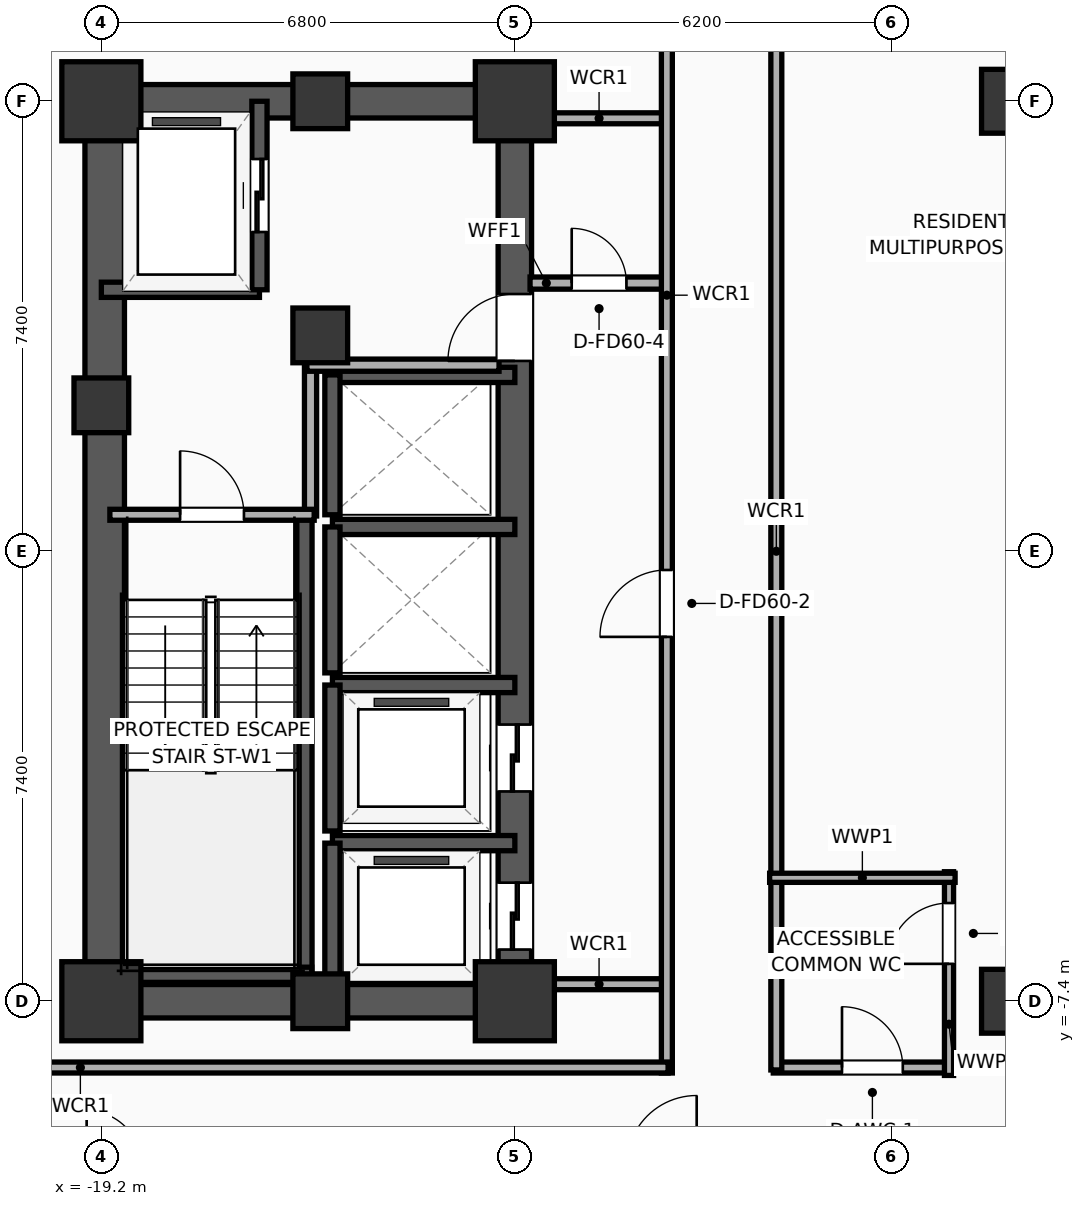
"""IFC4 building model, lengths in metres.
Left out: names, types, materials, properties, quantities, classifications, styles, units other than length and angle.
Written with IfcOpenShell. Run it as: python <this file> out.ifc"""

import sys

from ifc_helpers import new_model, si_unit, direction, frame, frame_2d, origin, origin_2d, place, context, subcontext, project, spatial, rectangle, extrude, element, fill, save


model = new_model("IFC4")
c1 = context("Model", 3, precision=1e-05, world=origin(), true_north=direction((0.0, 1.0)))
c2 = subcontext(c1, "Body", "Model", "MODEL_VIEW")
j1 = project(units=[si_unit("LENGTHUNIT", "METRE"), si_unit("PLANEANGLEUNIT", "RADIAN")], contexts=[c1])
p1 = place(None, origin())
s1 = spatial("IfcSite", under=j1, at=p1, CompositionType="ELEMENT")
p2 = place(p1, origin())
s2 = spatial("IfcBuilding", under=s1, at=p2, CompositionType="ELEMENT")
p3 = place(p2, frame((0.0, 0.0, 97.5)))
s3 = spatial("IfcBuildingStorey", under=s2, at=p3, CompositionType="ELEMENT", Elevation=97.5)
p4 = place(p3, frame((-19.2, -7.4, 0.0), z_axis=(0.0, 0.0, 1.0), x_axis=(1.0, 0.0, 0.0)))
e1 = element("IfcColumn", 1, at=p4, inside=s3, PredefinedType="COLUMN", context=c2, shape_type="SweptSolid", body=[
    extrude(rectangle(XDim=1.3, YDim=1.3, at=origin_2d()), origin(), (0.0, 0.0, 1.0), 3.9),
])
p5 = place(p3, frame((-19.2, 2.4, 0.0), z_axis=(0.0, 0.0, 1.0), x_axis=(1.0, 0.0, 0.0)))
e2 = element("IfcColumn", 2, at=p5, inside=s3, PredefinedType="COLUMN", context=c2, shape_type="SweptSolid", body=[
    extrude(rectangle(XDim=0.9, YDim=0.9, at=origin_2d()), origin(), (0.0, 0.0, 1.0), 3.9),
])
p6 = place(p3, frame((-19.2, 7.4, 0.0), z_axis=(0.0, 0.0, 1.0), x_axis=(1.0, 0.0, 0.0)))
e3 = element("IfcColumn", 3, at=p6, inside=s3, PredefinedType="COLUMN", context=c2, shape_type="SweptSolid", body=[
    extrude(rectangle(XDim=1.3, YDim=1.3, at=origin_2d()), origin(), (0.0, 0.0, 1.0), 3.9),
])
for number, where, z_axis, x_axis in (
    (4, (-15.6, -7.4, 0.0), (0.0, 0.0, 1.0), (1.0, 0.0, 0.0)),
    (5, (-15.6, 7.4, 0.0), (0.0, 0.0, 1.0), (1.0, 0.0, 0.0)),
):
    element("IfcColumn", number, at=place(p3, frame(where, z_axis=z_axis, x_axis=x_axis)), inside=s3, PredefinedType="COLUMN", context=c2, shape_type="SweptSolid", body=[
        extrude(rectangle(XDim=0.9, YDim=0.9, at=origin_2d()), origin(), (0.0, 0.0, 1.0), 3.9),
    ])
p7 = place(p3, frame((-12.4, -7.4, 0.0), z_axis=(0.0, 0.0, 1.0), x_axis=(1.0, 0.0, 0.0)))
e6 = element("IfcColumn", 6, at=p7, inside=s3, PredefinedType="COLUMN", context=c2, shape_type="SweptSolid", body=[
    extrude(rectangle(XDim=1.3, YDim=1.3, at=origin_2d()), origin(), (0.0, 0.0, 1.0), 3.9),
])
p8 = place(p3, frame((-15.6, 3.55, 0.0), z_axis=(0.0, 0.0, 1.0), x_axis=(1.0, 0.0, 0.0)))
e7 = element("IfcColumn", 7, at=p8, inside=s3, PredefinedType="COLUMN", context=c2, shape_type="SweptSolid", body=[
    extrude(rectangle(XDim=0.9, YDim=0.9, at=origin_2d()), origin(), (0.0, 0.0, 1.0), 3.9),
])
p9 = place(p3, frame((-12.4, 7.4, 0.0), z_axis=(0.0, 0.0, 1.0), x_axis=(1.0, 0.0, 0.0)))
e8 = element("IfcColumn", 8, at=p9, inside=s3, PredefinedType="COLUMN", context=c2, shape_type="SweptSolid", body=[
    extrude(rectangle(XDim=1.3, YDim=1.3, at=origin_2d()), origin(), (0.0, 0.0, 1.0), 3.9),
])
for number, where, z_axis, x_axis in (
    (9, (-19.475, -7.4, 0.0), (0.0, 0.0, 1.0), (1.0, 0.0, 0.0)),
    (10, (-19.475, 7.4, 0.0), (0.0, 0.0, 1.0), (1.0, 0.0, 0.0)),
):
    element("IfcWall", number, at=place(p3, frame(where, z_axis=z_axis, x_axis=x_axis)), inside=s3, PredefinedType="SHEAR", context=c2, shape_type="SweptSolid", body=[
        extrude(rectangle(XDim=7.35, YDim=0.55, at=frame_2d((3.675, 0.0))), origin(), (0.0, 0.0, 1.0), 3.65),
    ])
p10 = place(p3, frame((-19.145, -7.4, 0.0), z_axis=(0.0, 0.0, 1.0), x_axis=(0.0, 1.0, 0.0)))
e11 = element("IfcWall", 11, at=p10, inside=s3, PredefinedType="SHEAR", context=c2, shape_type="SweptSolid", body=[
    extrude(rectangle(XDim=14.8, YDim=0.65, at=frame_2d((7.4, 0.0))), origin(), (0.0, 0.0, 1.0), 3.65),
])
p11 = place(p3, frame((-12.4, -7.4, 0.0), z_axis=(0.0, 0.0, 1.0), x_axis=(0.0, 1.0, 0.0)))
e12 = element("IfcWall", 12, at=p11, inside=s3, PredefinedType="SHEAR", context=c2, shape_type="SweptSolid", body=[
    extrude(rectangle(XDim=14.8, YDim=0.55, at=frame_2d((7.4, 0.0))), origin(), (0.0, 0.0, 1.0), 3.65),
])
p12 = place(p11, frame((0.85, 0.0, 0.0)))
e13 = element("IfcOpeningElement", 13, at=p12, cuts=e12, PredefinedType="OPENING", context=c2, shape_type="SweptSolid", body=[
    extrude(rectangle(XDim=1.1, YDim=2.05, at=frame_2d((0.55, 1.025))), frame((0.0, 0.285, 0.0), z_axis=(0.0, -1.0, 0.0), x_axis=(1.0, 0.0, 0.0)), (0.0, 0.0, 1.0), 0.57),
])
p13 = place(p11, frame((3.45, 0.0, 0.0)))
e14 = element("IfcOpeningElement", 14, at=p13, cuts=e12, PredefinedType="OPENING", context=c2, shape_type="SweptSolid", body=[
    extrude(rectangle(XDim=1.1, YDim=2.05, at=frame_2d((0.55, 1.025))), frame((0.0, 0.285, 0.0), z_axis=(0.0, -1.0, 0.0), x_axis=(1.0, 0.0, 0.0)), (0.0, 0.0, 1.0), 0.57),
])
p14 = place(p11, frame((10.53, 0.0, 0.0)))
e15 = element("IfcOpeningElement", 15, at=p14, cuts=e12, PredefinedType="OPENING", context=c2, shape_type="SweptSolid", body=[
    extrude(rectangle(XDim=1.1, YDim=2.05, at=frame_2d((0.55, 1.025))), frame((0.0, 0.285, 0.0), z_axis=(0.0, -1.0, 0.0), x_axis=(1.0, 0.0, 0.0)), (0.0, 0.0, 1.0), 0.57),
])
p15 = place(p3, frame((-15.86, -7.085, 0.0), z_axis=(0.0, 0.0, 1.0), x_axis=(0.0, 1.0, 0.0)))
e16 = element("IfcWall", 16, at=p15, inside=s3, PredefinedType="SOLIDWALL", context=c2, shape_type="SweptSolid", body=[
    extrude(rectangle(XDim=7.685, YDim=0.25, at=frame_2d((3.843, 0.0))), origin(), (0.0, 0.0, 1.0), 3.65),
])
p16 = place(p3, frame((-19.2, -6.965, 0.0), z_axis=(0.0, 0.0, 1.0), x_axis=(1.0, 0.0, 0.0)))
e17 = element("IfcWall", 17, at=p16, inside=s3, PredefinedType="SOLIDWALL", context=c2, shape_type="SweptSolid", body=[
    extrude(rectangle(XDim=3.46, YDim=0.25, at=frame_2d((1.73, 0.0))), origin(), (0.0, 0.0, 1.0), 3.65),
])
for number, where, z_axis, x_axis in (
    (18, (-4.2, -7.4, 0.0), (0.0, 0.0, 1.0), (1.0, 0.0, 0.0)),
    (19, (-4.2, 7.4, 0.0), (0.0, 0.0, 1.0), (1.0, 0.0, 0.0)),
):
    element("IfcColumn", number, at=place(p3, frame(where, z_axis=z_axis, x_axis=x_axis)), inside=s3, PredefinedType="COLUMN", context=c2, shape_type="SweptSolid", body=[
        extrude(rectangle(XDim=1.05, YDim=1.05, at=origin_2d()), origin(), (0.0, 0.0, 1.0), 3.9),
    ])
p17 = place(p3, frame((-19.2, 4.3, 0.0), z_axis=(0.0, 0.0, 1.0), x_axis=(1.0, 0.0, 0.0)))
e20 = element("IfcWall", 20, at=p17, inside=s3, PredefinedType="SOLIDWALL", context=c2, shape_type="SweptSolid", body=[
    extrude(rectangle(XDim=2.6, YDim=0.25, at=frame_2d((1.3, 0.0))), origin(), (0.0, 0.0, 1.0), 3.65),
])
p18 = place(p3, frame((-16.6, 4.3, 0.0), z_axis=(0.0, 0.0, 1.0), x_axis=(0.0, 1.0, 0.0)))
e21 = element("IfcWall", 21, at=p18, inside=s3, PredefinedType="SOLIDWALL", context=c2, shape_type="SweptSolid", body=[
    extrude(rectangle(XDim=3.1, YDim=0.25, at=frame_2d((1.55, 0.0))), origin(), (0.0, 0.0, 1.0), 3.65),
])
p19 = place(p18, frame((0.95, 0.0, 0.0)))
e22 = element("IfcOpeningElement", 22, at=p19, cuts=e21, PredefinedType="OPENING", context=c2, shape_type="SweptSolid", body=[
    extrude(rectangle(XDim=1.2, YDim=2.05, at=frame_2d((0.6, 1.025))), frame((0.0, 0.135, 0.0), z_axis=(0.0, -1.0, 0.0), x_axis=(1.0, 0.0, 0.0)), (0.0, 0.0, 1.0), 0.27),
])
p20 = place(p3, frame((-12.4, -4.8, 0.0), z_axis=(0.0, 0.0, 1.0), x_axis=(-1.0, 0.0, 0.0)))
e23 = element("IfcWall", 23, at=p20, inside=s3, PredefinedType="SOLIDWALL", context=c2, shape_type="SweptSolid", body=[
    extrude(rectangle(XDim=3.0, YDim=0.25, at=frame_2d((1.5, 0.0))), origin(), (0.0, 0.0, 1.0), 3.65),
])
p21 = place(p3, frame((-15.4, -4.8, 0.0), z_axis=(0.0, 0.0, 1.0), x_axis=(0.0, -1.0, 0.0)))
e24 = element("IfcWall", 24, at=p21, inside=s3, PredefinedType="SOLIDWALL", context=c2, shape_type="SweptSolid", body=[
    extrude(rectangle(XDim=2.6, YDim=0.25, at=frame_2d((1.3, 0.0))), origin(), (0.0, 0.0, 1.0), 3.65),
])
p22 = place(p3, frame((-12.4, -2.2, 0.0), z_axis=(0.0, 0.0, 1.0), x_axis=(-1.0, 0.0, 0.0)))
e25 = element("IfcWall", 25, at=p22, inside=s3, PredefinedType="SOLIDWALL", context=c2, shape_type="SweptSolid", body=[
    extrude(rectangle(XDim=3.0, YDim=0.25, at=frame_2d((1.5, 0.0))), origin(), (0.0, 0.0, 1.0), 3.65),
])
p23 = place(p3, frame((-15.4, -2.2, 0.0), z_axis=(0.0, 0.0, 1.0), x_axis=(0.0, -1.0, 0.0)))
e26 = element("IfcWall", 26, at=p23, inside=s3, PredefinedType="SOLIDWALL", context=c2, shape_type="SweptSolid", body=[
    extrude(rectangle(XDim=2.4, YDim=0.25, at=frame_2d((1.2, 0.0))), origin(), (0.0, 0.0, 1.0), 3.65),
])
p24 = place(p3, frame((-12.4, 0.4, 0.0), z_axis=(0.0, 0.0, 1.0), x_axis=(-1.0, 0.0, 0.0)))
e27 = element("IfcWall", 27, at=p24, inside=s3, PredefinedType="SOLIDWALL", context=c2, shape_type="SweptSolid", body=[
    extrude(rectangle(XDim=3.0, YDim=0.25, at=frame_2d((1.5, 0.0))), origin(), (0.0, 0.0, 1.0), 3.65),
])
p25 = place(p3, frame((-15.4, 0.4, 0.0), z_axis=(0.0, 0.0, 1.0), x_axis=(0.0, -1.0, 0.0)))
e28 = element("IfcWall", 28, at=p25, inside=s3, PredefinedType="SOLIDWALL", context=c2, shape_type="SweptSolid", body=[
    extrude(rectangle(XDim=2.4, YDim=0.25, at=frame_2d((1.2, 0.0))), origin(), (0.0, 0.0, 1.0), 3.65),
])
p26 = place(p3, frame((-12.4, 2.9, 0.0), z_axis=(0.0, 0.0, 1.0), x_axis=(-1.0, 0.0, 0.0)))
e29 = element("IfcWall", 29, at=p26, inside=s3, PredefinedType="SOLIDWALL", context=c2, shape_type="SweptSolid", body=[
    extrude(rectangle(XDim=3.0, YDim=0.25, at=frame_2d((1.5, 0.0))), origin(), (0.0, 0.0, 1.0), 3.65),
])
p27 = place(p3, frame((-15.4, 2.9, 0.0), z_axis=(0.0, 0.0, 1.0), x_axis=(0.0, -1.0, 0.0)))
e30 = element("IfcWall", 30, at=p27, inside=s3, PredefinedType="SOLIDWALL", context=c2, shape_type="SweptSolid", body=[
    extrude(rectangle(XDim=2.3, YDim=0.25, at=frame_2d((1.15, 0.0))), origin(), (0.0, 0.0, 1.0), 3.65),
])
p28 = place(p3, frame((-15.76, 0.58, 0.0), z_axis=(0.0, 0.0, 1.0), x_axis=(0.0, 1.0, 0.0)))
e31 = element("IfcWall", 31, at=p28, inside=s3, PredefinedType="PARTITIONING", context=c2, shape_type="SweptSolid", body=[
    extrude(rectangle(XDim=2.52, YDim=0.2, at=frame_2d((1.26, 0.0))), origin(), (0.0, 0.0, 1.0), 3.65),
])
p29 = place(p3, frame((-15.82, 3.06, 0.0), z_axis=(0.0, 0.0, 1.0), x_axis=(1.0, 0.0, 0.0)))
e32 = element("IfcWall", 32, at=p29, inside=s3, PredefinedType="PARTITIONING", context=c2, shape_type="SweptSolid", body=[
    extrude(rectangle(XDim=3.16, YDim=0.2, at=frame_2d((1.58, 0.0))), origin(), (0.0, 0.0, 1.0), 3.65),
])
p30 = place(p3, frame((-19.06, 0.6, 0.0), z_axis=(0.0, 0.0, 1.0), x_axis=(1.0, 0.0, 0.0)))
e33 = element("IfcWall", 33, at=p30, inside=s3, PredefinedType="PARTITIONING", context=c2, shape_type="SweptSolid", body=[
    extrude(rectangle(XDim=3.36, YDim=0.18, at=frame_2d((1.68, 0.0))), origin(), (0.0, 0.0, 1.0), 3.65),
])
p31 = place(p30, frame((1.155, 0.0, 0.0)))
e34 = element("IfcOpeningElement", 34, at=p31, cuts=e33, PredefinedType="OPENING", context=c2, shape_type="SweptSolid", body=[
    extrude(rectangle(XDim=1.05, YDim=2.05, at=frame_2d((0.525, 1.025))), frame((0.0, 0.1, 0.0), z_axis=(0.0, -1.0, 0.0), x_axis=(1.0, 0.0, 0.0)), (0.0, 0.0, 1.0), 0.2),
])
p32 = place(p3, frame((-12.15, 4.41, 0.0), z_axis=(0.0, 0.0, 1.0), x_axis=(1.0, 0.0, 0.0)))
e35 = element("IfcWall", 35, at=p32, inside=s3, PredefinedType="PARTITIONING", context=c2, shape_type="SweptSolid", body=[
    extrude(rectangle(XDim=2.27, YDim=0.2, at=frame_2d((1.135, 0.0))), origin(), (0.0, 0.0, 1.0), 3.65),
])
p33 = place(p32, frame((0.685, 0.0, 0.0)))
e36 = element("IfcOpeningElement", 36, at=p33, cuts=e35, PredefinedType="OPENING", context=c2, shape_type="SweptSolid", body=[
    extrude(rectangle(XDim=0.9, YDim=2.05, at=frame_2d((0.45, 1.025))), frame((0.0, 0.11, 0.0), z_axis=(0.0, -1.0, 0.0), x_axis=(1.0, 0.0, 0.0)), (0.0, 0.0, 1.0), 0.22),
])
for number, where, z_axis, x_axis in (
    (37, (-12.15, 7.12, 0.0), (0.0, 0.0, 1.0), (1.0, 0.0, 0.0)),
    (38, (-12.15, -7.12, 0.0), (0.0, 0.0, 1.0), (1.0, 0.0, 0.0)),
):
    element("IfcWall", number, at=place(p3, frame(where, z_axis=z_axis, x_axis=x_axis)), inside=s3, PredefinedType="PARTITIONING", context=c2, shape_type="SweptSolid", body=[
        extrude(rectangle(XDim=2.27, YDim=0.18, at=frame_2d((1.135, 0.0))), origin(), (0.0, 0.0, 1.0), 3.65),
    ])
p34 = place(p3, frame((-9.9, -8.58, 0.0), z_axis=(0.0, 0.0, 1.0), x_axis=(0.0, 1.0, 0.0)))
e39 = element("IfcWall", 39, at=p34, inside=s3, PredefinedType="PARTITIONING", context=c2, shape_type="SweptSolid", body=[
    extrude(rectangle(XDim=17.16, YDim=0.18, at=frame_2d((8.58, 0.0))), origin(), (0.0, 0.0, 1.0), 3.65),
])
p35 = place(p34, frame((7.172, 0.0, 0.0)))
e40 = element("IfcOpeningElement", 40, at=p35, cuts=e39, PredefinedType="OPENING", context=c2, shape_type="SweptSolid", body=[
    extrude(rectangle(XDim=1.1, YDim=2.05, at=frame_2d((0.55, 1.025))), frame((0.0, 0.1, 0.0), z_axis=(0.0, -1.0, 0.0), x_axis=(1.0, 0.0, 0.0)), (0.0, 0.0, 1.0), 0.2),
])
p36 = place(p3, frame((-29.21, -8.49, 0.0), z_axis=(0.0, 0.0, 1.0), x_axis=(1.0, 0.0, 0.0)))
e41 = element("IfcWall", 41, at=p36, inside=s3, PredefinedType="PARTITIONING", context=c2, shape_type="SweptSolid", body=[
    extrude(rectangle(XDim=19.33, YDim=0.18, at=frame_2d((9.665, 0.0))), origin(), (0.0, 0.0, 1.0), 3.65),
])
p37 = place(p3, frame((-8.15, -8.49, 0.0), z_axis=(0.0, 0.0, 1.0), x_axis=(1.0, 0.0, 0.0)))
e42 = element("IfcWall", 42, at=p37, inside=s3, PredefinedType="PARTITIONING", context=c2, shape_type="SweptSolid", body=[
    extrude(rectangle(XDim=16.3, YDim=0.18, at=frame_2d((8.15, 0.0))), origin(), (0.0, 0.0, 1.0), 3.65),
])
p38 = place(p37, frame((1.13, 0.0, 0.0)))
e43 = element("IfcOpeningElement", 43, at=p38, cuts=e42, PredefinedType="OPENING", context=c2, shape_type="SweptSolid", body=[
    extrude(rectangle(XDim=1.0, YDim=2.05, at=frame_2d((0.5, 1.025))), frame((0.0, 0.1, 0.0), z_axis=(0.0, -1.0, 0.0), x_axis=(1.0, 0.0, 0.0)), (0.0, 0.0, 1.0), 0.2),
])
p39 = place(p37, frame((10.12, 0.0, 0.0)))
e44 = element("IfcOpeningElement", 44, at=p39, cuts=e42, PredefinedType="OPENING", context=c2, shape_type="SweptSolid", body=[
    extrude(rectangle(XDim=0.95, YDim=2.05, at=frame_2d((0.475, 1.025))), frame((0.0, 0.1, 0.0), z_axis=(0.0, -1.0, 0.0), x_axis=(1.0, 0.0, 0.0)), (0.0, 0.0, 1.0), 0.2),
])
p40 = place(p3, frame((-8.1, -8.53, 0.0), z_axis=(0.0, 0.0, 1.0), x_axis=(0.0, 1.0, 0.0)))
e45 = element("IfcWall", 45, at=p40, inside=s3, PredefinedType="PARTITIONING", context=c2, shape_type="SweptSolid", body=[
    extrude(rectangle(XDim=17.06, YDim=0.18, at=frame_2d((8.53, 0.0))), origin(), (0.0, 0.0, 1.0), 3.65),
])
p41 = place(p3, frame((-5.26, -8.62, 0.0), z_axis=(0.0, 0.0, 1.0), x_axis=(0.0, 1.0, 0.0)))
e46 = element("IfcWall", 46, at=p41, inside=s3, PredefinedType="PLUMBINGWALL", context=c2, shape_type="SweptSolid", body=[
    extrude(rectangle(XDim=3.35, YDim=0.15, at=frame_2d((1.675, 0.0))), origin(), (0.0, 0.0, 1.0), 3.65),
])
p42 = place(p41, frame((1.835, 0.0, 0.0)))
e47 = element("IfcOpeningElement", 47, at=p42, cuts=e46, PredefinedType="OPENING", context=c2, shape_type="SweptSolid", body=[
    extrude(rectangle(XDim=1.0, YDim=2.05, at=frame_2d((0.5, 1.025))), frame((0.0, 0.085, 0.0), z_axis=(0.0, -1.0, 0.0), x_axis=(1.0, 0.0, 0.0)), (0.0, 0.0, 1.0), 0.17),
])
p43 = place(p3, frame((-8.21, -5.37, 0.0), z_axis=(0.0, 0.0, 1.0), x_axis=(1.0, 0.0, 0.0)))
e48 = element("IfcWall", 48, at=p43, inside=s3, PredefinedType="PLUMBINGWALL", context=c2, shape_type="SweptSolid", body=[
    extrude(rectangle(XDim=3.05, YDim=0.15, at=frame_2d((1.525, 0.0))), origin(), (0.0, 0.0, 1.0), 3.65),
])
p44 = place(p19, origin())
e49 = element("IfcDoor", 49, at=p44, inside=s3, OperationType="SLIDING_TO_LEFT", PredefinedType="DOOR", context=c2, shape_type="SweptSolid", body=[
    extrude(rectangle(XDim=1.2, YDim=2.05, at=frame_2d((0.6, 1.025))), frame((0.0, 0.025, 0.0), z_axis=(0.0, -1.0, 0.0), x_axis=(1.0, 0.0, 0.0)), (0.0, 0.0, 1.0), 0.05),
])
fill(e22, e49)
p45 = place(p12, origin())
e50 = element("IfcDoor", 50, at=p45, inside=s3, OperationType="SLIDING_TO_LEFT", PredefinedType="DOOR", context=c2, shape_type="SweptSolid", body=[
    extrude(rectangle(XDim=1.1, YDim=2.05, at=frame_2d((0.55, 1.025))), frame((0.0, 0.025, 0.0), z_axis=(0.0, -1.0, 0.0), x_axis=(1.0, 0.0, 0.0)), (0.0, 0.0, 1.0), 0.05),
])
fill(e13, e50)
p46 = place(p13, origin())
e51 = element("IfcDoor", 51, at=p46, inside=s3, OperationType="SLIDING_TO_LEFT", PredefinedType="DOOR", context=c2, shape_type="SweptSolid", body=[
    extrude(rectangle(XDim=1.1, YDim=2.05, at=frame_2d((0.55, 1.025))), frame((0.0, 0.025, 0.0), z_axis=(0.0, -1.0, 0.0), x_axis=(1.0, 0.0, 0.0)), (0.0, 0.0, 1.0), 0.05),
])
fill(e14, e51)
p47 = place(p31, origin())
e52 = element("IfcDoor", 52, at=p47, inside=s3, OperationType="SINGLE_SWING_LEFT", PredefinedType="DOOR", context=c2, shape_type="SweptSolid", body=[
    extrude(rectangle(XDim=1.05, YDim=2.05, at=frame_2d((0.525, 1.025))), frame((0.0, 0.025, 0.0), z_axis=(0.0, -1.0, 0.0), x_axis=(1.0, 0.0, 0.0)), (0.0, 0.0, 1.0), 0.05),
])
fill(e34, e52)
p48 = place(p33, origin())
e53 = element("IfcDoor", 53, at=p48, inside=s3, OperationType="SINGLE_SWING_LEFT", PredefinedType="DOOR", context=c2, shape_type="SweptSolid", body=[
    extrude(rectangle(XDim=0.9, YDim=2.05, at=frame_2d((0.45, 1.025))), frame((0.0, 0.025, 0.0), z_axis=(0.0, -1.0, 0.0), x_axis=(1.0, 0.0, 0.0)), (0.0, 0.0, 1.0), 0.05),
])
fill(e36, e53)
p49 = place(p35, origin())
e54 = element("IfcDoor", 54, at=p49, inside=s3, OperationType="SINGLE_SWING_LEFT", PredefinedType="DOOR", context=c2, shape_type="SweptSolid", body=[
    extrude(rectangle(XDim=1.1, YDim=2.05, at=frame_2d((0.55, 1.025))), frame((0.0, 0.025, 0.0), z_axis=(0.0, -1.0, 0.0), x_axis=(1.0, 0.0, 0.0)), (0.0, 0.0, 1.0), 0.05),
])
fill(e40, e54)
p50 = place(p38, origin())
e55 = element("IfcDoor", 55, at=p50, inside=s3, OperationType="SINGLE_SWING_LEFT", PredefinedType="DOOR", context=c2, shape_type="SweptSolid", body=[
    extrude(rectangle(XDim=1.0, YDim=2.05, at=frame_2d((0.5, 1.025))), frame((0.0, 0.025, 0.0), z_axis=(0.0, -1.0, 0.0), x_axis=(1.0, 0.0, 0.0)), (0.0, 0.0, 1.0), 0.05),
])
fill(e43, e55)
p51 = place(p42, origin())
e56 = element("IfcDoor", 56, at=p51, inside=s3, OperationType="SINGLE_SWING_LEFT", PredefinedType="DOOR", context=c2, shape_type="SweptSolid", body=[
    extrude(rectangle(XDim=1.0, YDim=2.05, at=frame_2d((0.5, 1.025))), frame((0.0, 0.025, 0.0), z_axis=(0.0, -1.0, 0.0), x_axis=(1.0, 0.0, 0.0)), (0.0, 0.0, 1.0), 0.05),
])
fill(e47, e56)
p52 = place(p14, origin())
e57 = element("IfcDoor", 57, at=p52, inside=s3, OperationType="SINGLE_SWING_LEFT", PredefinedType="DOOR", context=c2, shape_type="SweptSolid", body=[
    extrude(rectangle(XDim=1.1, YDim=2.05, at=frame_2d((0.55, 1.025))), frame((0.0, 0.025, 0.0), z_axis=(0.0, -1.0, 0.0), x_axis=(1.0, 0.0, 0.0)), (0.0, 0.0, 1.0), 0.05),
])
fill(e15, e57)
save(model, sys.argv[1])
